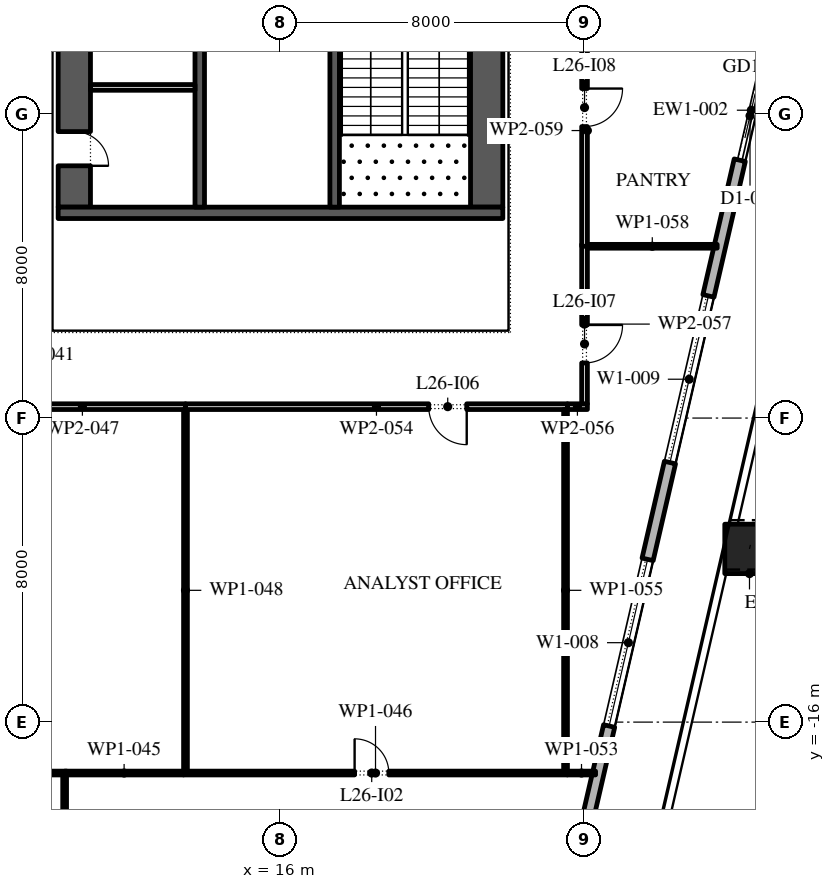
"""IFC4 building model, lengths in metres.
Left out: names, types, materials, properties, quantities, classifications, styles, units other than length and angle.
Written with IfcOpenShell. Run it as: python <this file> out.ifc"""

import sys

from ifc_helpers import new_model, si_unit, direction, frame, frame_2d, origin, origin_2d, place, context, subcontext, project, spatial, rectangle, extrude, element, fill, save


model = new_model("IFC4")
c1 = context("Model", 3, precision=1e-05, world=origin(), true_north=direction((0.0, 1.0)))
c2 = subcontext(c1, "Body", "Model", "MODEL_VIEW")
j1 = project(units=[si_unit("LENGTHUNIT", "METRE"), si_unit("PLANEANGLEUNIT", "RADIAN")], contexts=[c1])
p1 = place(None, origin())
s1 = spatial("IfcSite", under=j1, at=p1, CompositionType="ELEMENT")
p2 = place(p1, origin())
s2 = spatial("IfcBuilding", under=s1, at=p2, CompositionType="ELEMENT")
p3 = place(p2, frame((0.0, 0.0, 122.4)))
s3 = spatial("IfcBuildingStorey", under=s2, at=p3, CompositionType="ELEMENT", Elevation=122.4)
p4 = place(p3, frame((28.34, -11.443, 0.0), z_axis=(0.005810637908, 0.02533438128, 0.999662145733), x_axis=(-0.974691740237, 0.22355315143, 0.0)))
e1 = element("IfcColumn", 1, at=p4, inside=s3, PredefinedType="COLUMN", context=c2, shape_type="SweptSolid", body=[
    extrude(rectangle(XDim=1.3, YDim=1.3, at=origin_2d()), origin(), (0.0, 0.0, 1.0), 4.202),
])
p5 = place(p3, frame((-31.078, -15.421, 0.0), z_axis=(0.0, 0.0, 1.0), x_axis=(0.974370456532, -0.224949357493, 0.0)))
e2 = element("IfcWall", 2, at=p5, inside=s3, PredefinedType="STANDARD", context=c2, shape_type="SweptSolid", body=[
    extrude(rectangle(XDim=51.0, YDim=0.3, at=frame_2d((25.5, 0.0))), origin(), (0.0, 0.0, 1.0), 4.0),
])
p6 = place(p5, frame((1.875, 0.0, 0.45)))
e3 = element("IfcOpeningElement", 3, at=p6, cuts=e2, PredefinedType="OPENING", context=c2, shape_type="SweptSolid", body=[
    extrude(rectangle(XDim=4.5, YDim=2.65, at=frame_2d((2.25, 1.325))), frame((0.0, 0.16, 0.0), z_axis=(0.0, -1.0, 0.0), x_axis=(1.0, 0.0, 0.0)), (0.0, 0.0, 1.0), 0.32),
])
p7 = place(p5, frame((10.275, 0.0, 0.45)))
e4 = element("IfcOpeningElement", 4, at=p7, cuts=e2, PredefinedType="OPENING", context=c2, shape_type="SweptSolid", body=[
    extrude(rectangle(XDim=4.5, YDim=2.525, at=frame_2d((2.25, 1.262))), frame((0.0, 0.16, 0.0), z_axis=(0.0, -1.0, 0.0), x_axis=(1.0, 0.0, 0.0)), (0.0, 0.0, 1.0), 0.32),
])
p8 = place(p5, frame((18.825, 0.0, 0.45)))
e5 = element("IfcOpeningElement", 5, at=p8, cuts=e2, PredefinedType="OPENING", context=c2, shape_type="SweptSolid", body=[
    extrude(rectangle(XDim=4.5, YDim=2.5, at=frame_2d((2.25, 1.25))), frame((0.0, 0.16, 0.0), z_axis=(0.0, -1.0, 0.0), x_axis=(1.0, 0.0, 0.0)), (0.0, 0.0, 1.0), 0.32),
])
p9 = place(p5, frame((28.425, 0.0, 0.0)))
e6 = element("IfcOpeningElement", 6, at=p9, cuts=e2, PredefinedType="OPENING", context=c2, shape_type="SweptSolid", body=[
    extrude(rectangle(XDim=2.4, YDim=2.9, at=frame_2d((1.2, 1.45))), frame((0.0, 0.16, 0.0), z_axis=(0.0, -1.0, 0.0), x_axis=(1.0, 0.0, 0.0)), (0.0, 0.0, 1.0), 0.32),
])
p10 = place(p5, frame((35.925, 0.0, 0.45)))
e7 = element("IfcOpeningElement", 7, at=p10, cuts=e2, PredefinedType="OPENING", context=c2, shape_type="SweptSolid", body=[
    extrude(rectangle(XDim=4.5, YDim=2.45, at=frame_2d((2.25, 1.225))), frame((0.0, 0.16, 0.0), z_axis=(0.0, -1.0, 0.0), x_axis=(1.0, 0.0, 0.0)), (0.0, 0.0, 1.0), 0.32),
])
p11 = place(p5, frame((44.475, 0.0, 0.45)))
e8 = element("IfcOpeningElement", 8, at=p11, cuts=e2, PredefinedType="OPENING", context=c2, shape_type="SweptSolid", body=[
    extrude(rectangle(XDim=4.5, YDim=2.45, at=frame_2d((2.25, 1.225))), frame((0.0, 0.16, 0.0), z_axis=(0.0, -1.0, 0.0), x_axis=(1.0, 0.0, 0.0)), (0.0, 0.0, 1.0), 0.32),
])
p12 = place(p3, frame((22.82, -24.016, 0.0), z_axis=(0.0, 0.0, 1.0), x_axis=(0.224953880882, 0.974369412223, 0.0)))
e9 = element("IfcWall", 9, at=p12, inside=s3, PredefinedType="STANDARD", context=c2, shape_type="SweptSolid", body=[
    extrude(rectangle(XDim=49.5, YDim=0.3, at=frame_2d((24.75, 0.0))), origin(), (0.0, 0.0, 1.0), 4.0),
])
p13 = place(p12, frame((1.157, 0.0, 0.45)))
e10 = element("IfcOpeningElement", 10, at=p13, cuts=e9, PredefinedType="OPENING", context=c2, shape_type="SweptSolid", body=[
    extrude(rectangle(XDim=4.5, YDim=3.05, at=frame_2d((2.25, 1.525))), frame((0.0, 0.16, 0.0), z_axis=(0.0, -1.0, 0.0), x_axis=(1.0, 0.0, 0.0)), (0.0, 0.0, 1.0), 0.32),
])
p14 = place(p12, frame((8.121, 0.0, 0.45)))
e11 = element("IfcOpeningElement", 11, at=p14, cuts=e9, PredefinedType="OPENING", context=c2, shape_type="SweptSolid", body=[
    extrude(rectangle(XDim=4.5, YDim=3.05, at=frame_2d((2.25, 1.525))), frame((0.0, 0.16, 0.0), z_axis=(0.0, -1.0, 0.0), x_axis=(1.0, 0.0, 0.0)), (0.0, 0.0, 1.0), 0.32),
])
p15 = place(p12, frame((15.236, 0.0, 0.45)))
e12 = element("IfcOpeningElement", 12, at=p15, cuts=e9, PredefinedType="OPENING", context=c2, shape_type="SweptSolid", body=[
    extrude(rectangle(XDim=4.5, YDim=3.05, at=frame_2d((2.25, 1.525))), frame((0.0, 0.16, 0.0), z_axis=(0.0, -1.0, 0.0), x_axis=(1.0, 0.0, 0.0)), (0.0, 0.0, 1.0), 0.32),
])
p16 = place(p12, frame((23.4, 0.0, 0.0)))
e13 = element("IfcOpeningElement", 13, at=p16, cuts=e9, PredefinedType="OPENING", context=c2, shape_type="SweptSolid", body=[
    extrude(rectangle(XDim=2.4, YDim=3.5, at=frame_2d((1.2, 1.75))), frame((0.0, 0.16, 0.0), z_axis=(0.0, -1.0, 0.0), x_axis=(1.0, 0.0, 0.0)), (0.0, 0.0, 1.0), 0.32),
])
p17 = place(p12, frame((29.464, 0.0, 0.45)))
e14 = element("IfcOpeningElement", 14, at=p17, cuts=e9, PredefinedType="OPENING", context=c2, shape_type="SweptSolid", body=[
    extrude(rectangle(XDim=4.5, YDim=2.875, at=frame_2d((2.25, 1.438))), frame((0.0, 0.16, 0.0), z_axis=(0.0, -1.0, 0.0), x_axis=(1.0, 0.0, 0.0)), (0.0, 0.0, 1.0), 0.32),
])
p18 = place(p12, frame((36.579, 0.0, 0.45)))
e15 = element("IfcOpeningElement", 15, at=p18, cuts=e9, PredefinedType="OPENING", context=c2, shape_type="SweptSolid", body=[
    extrude(rectangle(XDim=4.5, YDim=2.825, at=frame_2d((2.25, 1.413))), frame((0.0, 0.16, 0.0), z_axis=(0.0, -1.0, 0.0), x_axis=(1.0, 0.0, 0.0)), (0.0, 0.0, 1.0), 0.32),
])
p19 = place(p12, frame((43.693, 0.0, 0.45)))
e16 = element("IfcOpeningElement", 16, at=p19, cuts=e9, PredefinedType="OPENING", context=c2, shape_type="SweptSolid", body=[
    extrude(rectangle(XDim=4.5, YDim=2.75, at=frame_2d((2.25, 1.375))), frame((0.0, 0.16, 0.0), z_axis=(0.0, -1.0, 0.0), x_axis=(1.0, 0.0, 0.0)), (0.0, 0.0, 1.0), 0.32),
])
p20 = place(p3, frame((21.425, -2.45, 0.0), z_axis=(0.0, 0.0, 1.0), x_axis=(0.0, 1.0, 0.0)))
e17 = element("IfcWall", 17, at=p20, inside=s3, PredefinedType="SHEAR", context=c2, shape_type="SweptSolid", body=[
    extrude(rectangle(XDim=27.9, YDim=0.85, at=frame_2d((13.95, 0.0))), origin(), (0.0, 0.0, 1.0), 4.0),
])
p21 = place(p20, frame((5.05, 0.0, 0.0)))
e18 = element("IfcOpeningElement", 18, at=p21, cuts=e17, PredefinedType="OPENING", context=c2, shape_type="SweptSolid", body=[
    extrude(rectangle(XDim=1.2, YDim=2.1, at=frame_2d((0.6, 1.05))), frame((0.0, 0.435, 0.0), z_axis=(0.0, -1.0, 0.0), x_axis=(1.0, 0.0, 0.0)), (0.0, 0.0, 1.0), 0.87),
])
p22 = place(p20, frame((21.65, 0.0, 0.0)))
e19 = element("IfcOpeningElement", 19, at=p22, cuts=e17, PredefinedType="OPENING", context=c2, shape_type="SweptSolid", body=[
    extrude(rectangle(XDim=1.2, YDim=2.1, at=frame_2d((0.6, 1.05))), frame((0.0, 0.435, 0.0), z_axis=(0.0, -1.0, 0.0), x_axis=(1.0, 0.0, 0.0)), (0.0, 0.0, 1.0), 0.87),
])
p23 = place(p3, frame((10.575, -2.45, 0.0), z_axis=(0.0, 0.0, 1.0), x_axis=(0.0, 1.0, 0.0)))
e20 = element("IfcWall", 20, at=p23, inside=s3, PredefinedType="SHEAR", context=c2, shape_type="SweptSolid", body=[
    extrude(rectangle(XDim=27.9, YDim=0.85, at=frame_2d((13.95, 0.0))), origin(), (0.0, 0.0, 1.0), 4.0),
])
p24 = place(p23, frame((23.65, 0.0, 0.0)))
e21 = element("IfcOpeningElement", 21, at=p24, cuts=e20, PredefinedType="OPENING", context=c2, shape_type="SweptSolid", body=[
    extrude(rectangle(XDim=2.4, YDim=2.1, at=frame_2d((1.2, 1.05))), frame((0.0, 0.435, 0.0), z_axis=(0.0, -1.0, 0.0), x_axis=(1.0, 0.0, 0.0)), (0.0, 0.0, 1.0), 0.87),
])
p25 = place(p23, frame((1.087, 0.0, 0.0)))
e22 = element("IfcOpeningElement", 22, at=p25, cuts=e20, PredefinedType="OPENING", context=c2, shape_type="SweptSolid", body=[
    extrude(rectangle(XDim=0.9, YDim=2.1, at=frame_2d((0.45, 1.05))), frame((0.0, 0.435, 0.0), z_axis=(0.0, -1.0, 0.0), x_axis=(1.0, 0.0, 0.0)), (0.0, 0.0, 1.0), 0.87),
])
p26 = place(p23, frame((4.262, 0.0, 0.0)))
e23 = element("IfcOpeningElement", 23, at=p26, cuts=e20, PredefinedType="OPENING", context=c2, shape_type="SweptSolid", body=[
    extrude(rectangle(XDim=1.0, YDim=2.1, at=frame_2d((0.5, 1.05))), frame((0.0, 0.435, 0.0), z_axis=(0.0, -1.0, 0.0), x_axis=(1.0, 0.0, 0.0)), (0.0, 0.0, 1.0), 0.87),
])
p27 = place(p3, frame((10.15, -2.6, 0.0), z_axis=(0.0, 0.0, 1.0), x_axis=(1.0, 0.0, 0.0)))
e24 = element("IfcWall", 24, at=p27, inside=s3, PredefinedType="SHEAR", context=c2, shape_type="SweptSolid", body=[
    extrude(rectangle(XDim=11.7, YDim=0.3, at=frame_2d((5.85, 0.0))), origin(), (0.0, 0.0, 1.0), 4.0),
])
p28 = place(p3, frame((17.425, -2.45, 0.0), z_axis=(0.0, 0.0, 1.0), x_axis=(0.0, 1.0, 0.0)))
e25 = element("IfcWall", 25, at=p28, inside=s3, PredefinedType="SHEAR", context=c2, shape_type="SweptSolid", body=[
    extrude(rectangle(XDim=6.3, YDim=0.25, at=frame_2d((3.15, 0.0))), origin(), (0.0, 0.0, 1.0), 4.0),
])
p29 = place(p28, frame((5.05, 0.0, 0.0)))
e26 = element("IfcOpeningElement", 26, at=p29, cuts=e25, PredefinedType="OPENING", context=c2, shape_type="SweptSolid", body=[
    extrude(rectangle(XDim=1.2, YDim=2.1, at=frame_2d((0.6, 1.05))), frame((0.0, 0.135, 0.0), z_axis=(0.0, -1.0, 0.0), x_axis=(1.0, 0.0, 0.0)), (0.0, 0.0, 1.0), 0.27),
])
p30 = place(p3, frame((13.875, -2.45, 0.0), z_axis=(0.0, 0.0, 1.0), x_axis=(0.0, 1.0, 0.0)))
e27 = element("IfcWall", 27, at=p30, inside=s3, PredefinedType="SHEAR", context=c2, shape_type="SweptSolid", body=[
    extrude(rectangle(XDim=21.3, YDim=0.25, at=frame_2d((10.65, 0.0))), origin(), (0.0, 0.0, 1.0), 4.0),
])
p31 = place(p30, frame((10.196, 0.0, 0.0)))
e28 = element("IfcOpeningElement", 28, at=p31, cuts=e27, PredefinedType="OPENING", context=c2, shape_type="SweptSolid", body=[
    extrude(rectangle(XDim=0.9, YDim=2.1, at=frame_2d((0.45, 1.05))), frame((0.0, 0.135, 0.0), z_axis=(0.0, -1.0, 0.0), x_axis=(1.0, 0.0, 0.0)), (0.0, 0.0, 1.0), 0.27),
])
p32 = place(p30, frame((16.475, 0.0, 0.0)))
e29 = element("IfcOpeningElement", 29, at=p32, cuts=e27, PredefinedType="OPENING", context=c2, shape_type="SweptSolid", body=[
    extrude(rectangle(XDim=0.9, YDim=2.1, at=frame_2d((0.45, 1.05))), frame((0.0, 0.135, 0.0), z_axis=(0.0, -1.0, 0.0), x_axis=(1.0, 0.0, 0.0)), (0.0, 0.0, 1.0), 0.27),
])
p33 = place(p30, frame((6.971, 0.0, 0.0)))
e30 = element("IfcOpeningElement", 30, at=p33, cuts=e27, PredefinedType="OPENING", context=c2, shape_type="SweptSolid", body=[
    extrude(rectangle(XDim=1.1, YDim=2.1, at=frame_2d((0.55, 1.05))), frame((0.0, 0.135, 0.0), z_axis=(0.0, -1.0, 0.0), x_axis=(1.0, 0.0, 0.0)), (0.0, 0.0, 1.0), 0.27),
])
p34 = place(p3, frame((11.0, 0.7, 0.0), z_axis=(0.0, 0.0, 1.0), x_axis=(1.0, 0.0, 0.0)))
e31 = element("IfcWall", 31, at=p34, inside=s3, PredefinedType="PARTITIONING", context=c2, shape_type="SweptSolid", body=[
    extrude(rectangle(XDim=2.75, YDim=0.15, at=frame_2d((1.375, 0.0))), origin(), (0.0, 0.0, 1.0), 4.0),
])
p35 = place(p3, frame((2.04, -17.34, 0.0), z_axis=(0.0, 0.0, 1.0), x_axis=(1.0, 0.0, 0.0)))
e32 = element("IfcWall", 32, at=p35, inside=s3, PredefinedType="PARTITIONING", context=c2, shape_type="SweptSolid", body=[
    extrude(rectangle(XDim=8.33, YDim=0.1, at=frame_2d((4.165, 0.0))), origin(), (0.0, 0.0, 1.0), 4.0),
])
p36 = place(p3, frame((10.32, -17.39, 0.0), z_axis=(0.0, 0.0, 1.0), x_axis=(0.0, -1.0, 0.0)))
e33 = element("IfcWall", 33, at=p36, inside=s3, PredefinedType="PARTITIONING", context=c2, shape_type="SweptSolid", body=[
    extrude(rectangle(XDim=7.517, YDim=0.1, at=frame_2d((3.759, 0.0))), origin(), (0.0, 0.0, 1.0), 4.0),
])
p37 = place(p3, frame((10.32, -17.34, 0.0), z_axis=(0.0, 0.0, 1.0), x_axis=(1.0, 0.0, 0.0)))
e34 = element("IfcWall", 34, at=p37, inside=s3, PredefinedType="PARTITIONING", context=c2, shape_type="SweptSolid", body=[
    extrude(rectangle(XDim=3.13, YDim=0.1, at=frame_2d((1.565, 0.0))), origin(), (0.0, 0.0, 1.0), 4.0),
])
p38 = place(p3, frame((13.45, -17.34, 0.0), z_axis=(0.0, 0.0, 1.0), x_axis=(1.0, 0.0, 0.0)))
e35 = element("IfcWall", 35, at=p38, inside=s3, PredefinedType="PARTITIONING", context=c2, shape_type="SweptSolid", body=[
    extrude(rectangle(XDim=10.1, YDim=0.1, at=frame_2d((5.05, 0.0))), origin(), (0.0, 0.0, 1.0), 4.0),
])
p39 = place(p38, frame((4.5, 0.0, 0.0)))
e36 = element("IfcOpeningElement", 36, at=p39, cuts=e35, PredefinedType="OPENING", context=c2, shape_type="SweptSolid", body=[
    extrude(rectangle(XDim=0.9, YDim=2.1, at=frame_2d((0.45, 1.05))), frame((0.0, 0.06, 0.0), z_axis=(0.0, -1.0, 0.0), x_axis=(1.0, 0.0, 0.0)), (0.0, 0.0, 1.0), 0.12),
])
p40 = place(p3, frame((13.5, -7.7, 0.0), z_axis=(0.0, 0.0, 1.0), x_axis=(-1.0, 0.0, 0.0)))
e37 = element("IfcWall", 37, at=p40, inside=s3, PredefinedType="PARTITIONING", context=c2, shape_type="SweptSolid", body=[
    extrude(rectangle(XDim=5.425, YDim=0.15, at=frame_2d((2.712, 0.0))), origin(), (0.0, 0.0, 1.0), 4.0),
])
p41 = place(p3, frame((13.5, -7.775, 0.0), z_axis=(0.0, 0.0, 1.0), x_axis=(0.0, -1.0, 0.0)))
e38 = element("IfcWall", 38, at=p41, inside=s3, PredefinedType="PARTITIONING", context=c2, shape_type="SweptSolid", body=[
    extrude(rectangle(XDim=9.515, YDim=0.1, at=frame_2d((4.758, 0.0))), origin(), (0.0, 0.0, 1.0), 4.0),
])
p42 = place(p3, frame((23.55, -17.34, 0.0), z_axis=(0.0, 0.0, 1.0), x_axis=(1.0, 0.0, 0.0)))
e39 = element("IfcWall", 39, at=p42, inside=s3, PredefinedType="PARTITIONING", context=c2, shape_type="SweptSolid", body=[
    extrude(rectangle(XDim=0.74, YDim=0.1, at=frame_2d((0.37, 0.0))), origin(), (0.0, 0.0, 1.0), 4.0),
])
p43 = place(p3, frame((23.55, -7.7, 0.0), z_axis=(0.0, 0.0, 1.0), x_axis=(-1.0, 0.0, 0.0)))
e40 = element("IfcWall", 40, at=p43, inside=s3, PredefinedType="PARTITIONING", context=c2, shape_type="SweptSolid", body=[
    extrude(rectangle(XDim=10.05, YDim=0.15, at=frame_2d((5.025, 0.0))), origin(), (0.0, 0.0, 1.0), 4.0),
])
p44 = place(p43, frame((2.65, 0.0, 0.0)))
e41 = element("IfcOpeningElement", 41, at=p44, cuts=e40, PredefinedType="OPENING", context=c2, shape_type="SweptSolid", body=[
    extrude(rectangle(XDim=1.0, YDim=2.1, at=frame_2d((0.5, 1.05))), frame((0.0, 0.085, 0.0), z_axis=(0.0, -1.0, 0.0), x_axis=(1.0, 0.0, 0.0)), (0.0, 0.0, 1.0), 0.17),
])
p45 = place(p3, frame((23.5, -7.775, 0.0), z_axis=(0.0, 0.0, 1.0), x_axis=(0.0, -1.0, 0.0)))
e42 = element("IfcWall", 42, at=p45, inside=s3, PredefinedType="PARTITIONING", context=c2, shape_type="SweptSolid", body=[
    extrude(rectangle(XDim=9.515, YDim=0.1, at=frame_2d((4.758, 0.0))), origin(), (0.0, 0.0, 1.0), 4.0),
])
p46 = place(p3, frame((24.075, -7.7, 0.0), z_axis=(0.0, 0.0, 1.0), x_axis=(-1.0, 0.0, 0.0)))
e43 = element("IfcWall", 43, at=p46, inside=s3, PredefinedType="PARTITIONING", context=c2, shape_type="SweptSolid", body=[
    extrude(rectangle(XDim=0.525, YDim=0.15, at=frame_2d((0.262, 0.0))), origin(), (0.0, 0.0, 1.0), 4.0),
])
p47 = place(p3, frame((24.0, -3.43, 0.0), z_axis=(0.0, 0.0, 1.0), x_axis=(0.0, -1.0, 0.0)))
e44 = element("IfcWall", 44, at=p47, inside=s3, PredefinedType="PARTITIONING", context=c2, shape_type="SweptSolid", body=[
    extrude(rectangle(XDim=4.195, YDim=0.15, at=frame_2d((2.098, 0.0))), origin(), (0.0, 0.0, 1.0), 4.0),
])
p48 = place(p47, frame((2.12, 0.0, 0.0)))
e45 = element("IfcOpeningElement", 45, at=p48, cuts=e44, PredefinedType="OPENING", context=c2, shape_type="SweptSolid", body=[
    extrude(rectangle(XDim=1.0, YDim=2.1, at=frame_2d((0.5, 1.05))), frame((0.0, 0.085, 0.0), z_axis=(0.0, -1.0, 0.0), x_axis=(1.0, 0.0, 0.0)), (0.0, 0.0, 1.0), 0.17),
])
p49 = place(p3, frame((24.075, -3.48, 0.0), z_axis=(0.0, 0.0, 1.0), x_axis=(1.0, 0.0, 0.0)))
e46 = element("IfcWall", 46, at=p49, inside=s3, PredefinedType="PARTITIONING", context=c2, shape_type="SweptSolid", body=[
    extrude(rectangle(XDim=3.415, YDim=0.1, at=frame_2d((1.708, 0.0))), origin(), (0.0, 0.0, 1.0), 4.0),
])
p50 = place(p3, frame((24.0, 2.61, 0.0), z_axis=(0.0, 0.0, 1.0), x_axis=(0.0, -1.0, 0.0)))
e47 = element("IfcWall", 47, at=p50, inside=s3, PredefinedType="PARTITIONING", context=c2, shape_type="SweptSolid", body=[
    extrude(rectangle(XDim=6.09, YDim=0.15, at=frame_2d((3.045, 0.0))), origin(), (0.0, 0.0, 1.0), 4.0),
])
p51 = place(p50, frame((1.94, 0.0, 0.0)))
e48 = element("IfcOpeningElement", 48, at=p51, cuts=e47, PredefinedType="OPENING", context=c2, shape_type="SweptSolid", body=[
    extrude(rectangle(XDim=1.0, YDim=2.1, at=frame_2d((0.5, 1.05))), frame((0.0, 0.085, 0.0), z_axis=(0.0, -1.0, 0.0), x_axis=(1.0, 0.0, 0.0)), (0.0, 0.0, 1.0), 0.17),
])
p52 = place(p14, origin())
e49 = element("IfcWindow", 49, at=p52, inside=s3, PartitioningType="DOUBLE_PANEL_VERTICAL", PredefinedType="WINDOW", context=c2, shape_type="SweptSolid", body=[
    extrude(rectangle(XDim=4.5, YDim=3.05, at=frame_2d((2.25, 1.525))), frame((0.0, 0.03, 0.0), z_axis=(0.0, -1.0, 0.0), x_axis=(1.0, 0.0, 0.0)), (0.0, 0.0, 1.0), 0.06),
])
fill(e11, e49)
p53 = place(p15, origin())
e50 = element("IfcWindow", 50, at=p53, inside=s3, PartitioningType="DOUBLE_PANEL_VERTICAL", PredefinedType="WINDOW", context=c2, shape_type="SweptSolid", body=[
    extrude(rectangle(XDim=4.5, YDim=3.05, at=frame_2d((2.25, 1.525))), frame((0.0, 0.03, 0.0), z_axis=(0.0, -1.0, 0.0), x_axis=(1.0, 0.0, 0.0)), (0.0, 0.0, 1.0), 0.06),
])
fill(e12, e50)
p54 = place(p16, origin())
e51 = element("IfcDoor", 51, at=p54, inside=s3, OperationType="DOUBLE_DOOR_SLIDING", PredefinedType="DOOR", context=c2, shape_type="SweptSolid", body=[
    extrude(rectangle(XDim=2.4, YDim=3.5, at=frame_2d((1.2, 1.75))), frame((0.0, 0.025, 0.0), z_axis=(0.0, -1.0, 0.0), x_axis=(1.0, 0.0, 0.0)), (0.0, 0.0, 1.0), 0.05),
])
fill(e13, e51)
p55 = place(p25, frame((0.9, -0.8, 0.0), z_axis=(0.0, 0.0, 1.0), x_axis=(-1.0, 0.0, 0.0)))
e52 = element("IfcDoor", 52, at=p55, inside=s3, OperationType="SINGLE_SWING_LEFT", PredefinedType="DOOR", context=c2, shape_type="SweptSolid", body=[
    extrude(rectangle(XDim=0.9, YDim=2.1, at=frame_2d((0.45, 1.05))), frame((0.0, -0.375, 0.0), z_axis=(0.0, -1.0, 0.0), x_axis=(1.0, 0.0, 0.0)), (0.0, 0.0, 1.0), 0.05),
])
fill(e22, e52)
p56 = place(p39, origin())
e53 = element("IfcDoor", 53, at=p56, inside=s3, OperationType="SINGLE_SWING_RIGHT", PredefinedType="DOOR", context=c2, shape_type="SweptSolid", body=[
    extrude(rectangle(XDim=0.9, YDim=2.1, at=frame_2d((0.45, 1.05))), frame((0.0, 0.025, 0.0), z_axis=(0.0, -1.0, 0.0), x_axis=(1.0, 0.0, 0.0)), (0.0, 0.0, 1.0), 0.05),
])
fill(e36, e53)
p57 = place(p44, origin())
e54 = element("IfcDoor", 54, at=p57, inside=s3, OperationType="SINGLE_SWING_RIGHT", PredefinedType="DOOR", context=c2, shape_type="SweptSolid", body=[
    extrude(rectangle(XDim=1.0, YDim=2.1, at=frame_2d((0.5, 1.05))), frame((0.0, 0.025, 0.0), z_axis=(0.0, -1.0, 0.0), x_axis=(1.0, 0.0, 0.0)), (0.0, 0.0, 1.0), 0.05),
])
fill(e41, e54)
p58 = place(p48, origin())
e55 = element("IfcDoor", 55, at=p58, inside=s3, OperationType="SINGLE_SWING_RIGHT", PredefinedType="DOOR", context=c2, shape_type="SweptSolid", body=[
    extrude(rectangle(XDim=1.0, YDim=2.1, at=frame_2d((0.5, 1.05))), frame((0.0, 0.025, 0.0), z_axis=(0.0, -1.0, 0.0), x_axis=(1.0, 0.0, 0.0)), (0.0, 0.0, 1.0), 0.05),
])
fill(e45, e55)
p59 = place(p51, origin())
e56 = element("IfcDoor", 56, at=p59, inside=s3, OperationType="SINGLE_SWING_RIGHT", PredefinedType="DOOR", context=c2, shape_type="SweptSolid", body=[
    extrude(rectangle(XDim=1.0, YDim=2.1, at=frame_2d((0.5, 1.05))), frame((0.0, 0.025, 0.0), z_axis=(0.0, -1.0, 0.0), x_axis=(1.0, 0.0, 0.0)), (0.0, 0.0, 1.0), 0.05),
])
fill(e48, e56)
save(model, sys.argv[1])
